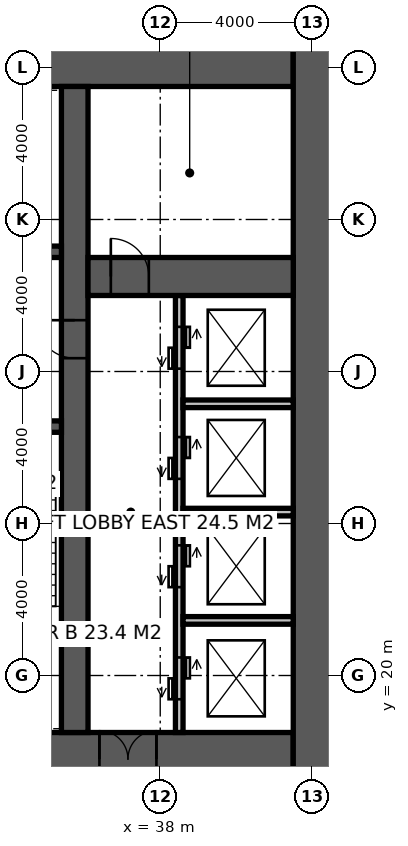
"""IFC4 building model, lengths in metres.
Left out: names, types, materials, properties, quantities, classifications, styles, units other than length and angle.
Written with IfcOpenShell. Run it as: python <this file> out.ifc"""

import sys

from ifc_helpers import new_model, si_unit, direction, frame, frame_2d, origin, place, context, subcontext, project, spatial, rectangle, extrude, element, fill, save


model = new_model("IFC4")
c1 = context("Model", 3, precision=1e-05, world=origin(), true_north=direction((0.0, 1.0)))
c2 = subcontext(c1, "Body", "Model", "MODEL_VIEW")
j1 = project(units=[si_unit("LENGTHUNIT", "METRE"), si_unit("PLANEANGLEUNIT", "RADIAN")], contexts=[c1])
p1 = place(None, origin())
s1 = spatial("IfcSite", under=j1, at=p1, CompositionType="ELEMENT")
p2 = place(p1, origin())
s2 = spatial("IfcBuilding", under=s1, at=p2, CompositionType="ELEMENT")
p3 = place(p2, frame((0.0, 0.0, 11.0)))
s3 = spatial("IfcBuildingStorey", under=s2, at=p3, CompositionType="ELEMENT", Elevation=11.0)
p4 = place(p3, frame((18.5, 17.8, -0.15), z_axis=(0.0, 0.0, 1.0), x_axis=(1.0, 0.0, 0.0)))
e1 = element("IfcWall", 1, at=p4, inside=s3, PredefinedType="SHEAR", context=c2, shape_type="SweptSolid", body=[
    extrude(rectangle(XDim=23.0, YDim=1.4, at=frame_2d((11.5, 0.0))), origin(), (0.0, 0.0, 1.0), 4.0),
])
p5 = place(p4, frame((3.45, 0.0, 0.15)))
e2 = element("IfcOpeningElement", 2, at=p5, cuts=e1, PredefinedType="OPENING", context=c2, shape_type="SweptSolid", body=[
    extrude(rectangle(XDim=1.5, YDim=2.4, at=frame_2d((0.75, 1.2))), frame((0.0, 0.71, 0.0), z_axis=(0.0, -1.0, 0.0), x_axis=(1.0, 0.0, 0.0)), (0.0, 0.0, 1.0), 1.42),
])
p6 = place(p4, frame((17.9, 0.0, 0.15)))
e3 = element("IfcOpeningElement", 3, at=p6, cuts=e1, PredefinedType="OPENING", context=c2, shape_type="SweptSolid", body=[
    extrude(rectangle(XDim=1.5, YDim=2.4, at=frame_2d((0.75, 1.2))), frame((0.0, 0.71, 0.0), z_axis=(0.0, -1.0, 0.0), x_axis=(1.0, 0.0, 0.0)), (0.0, 0.0, 1.0), 1.42),
])
p7 = place(p4, frame((0.9, 0.0, 0.15)))
e4 = element("IfcOpeningElement", 4, at=p7, cuts=e1, PredefinedType="OPENING", context=c2, shape_type="SweptSolid", body=[
    extrude(rectangle(XDim=1.0, YDim=2.2, at=frame_2d((0.5, 1.1))), frame((0.0, 0.71, 0.0), z_axis=(0.0, -1.0, 0.0), x_axis=(1.0, 0.0, 0.0)), (0.0, 0.0, 1.0), 1.42),
])
p8 = place(p3, frame((18.5, 36.2, -0.15), z_axis=(0.0, 0.0, 1.0), x_axis=(1.0, 0.0, 0.0)))
e5 = element("IfcWall", 5, at=p8, inside=s3, PredefinedType="SHEAR", context=c2, shape_type="SweptSolid", body=[
    extrude(rectangle(XDim=23.0, YDim=1.4, at=frame_2d((11.5, 0.0))), origin(), (0.0, 0.0, 1.0), 4.0),
])
p9 = place(p3, frame((42.0, 17.1, -0.15), z_axis=(0.0, 0.0, 1.0), x_axis=(0.0, 1.0, 0.0)))
e6 = element("IfcWall", 6, at=p9, inside=s3, PredefinedType="SHEAR", context=c2, shape_type="SweptSolid", body=[
    extrude(rectangle(XDim=19.8, YDim=1.0, at=frame_2d((9.9, 0.0))), origin(), (0.0, 0.0, 1.0), 4.0),
])
p10 = place(p3, frame((35.75, 18.5, -0.15), z_axis=(0.0, 0.0, 1.0), x_axis=(0.0, 1.0, 0.0)))
e7 = element("IfcWall", 7, at=p10, inside=s3, PredefinedType="SHEAR", context=c2, shape_type="SweptSolid", body=[
    extrude(rectangle(XDim=17.0, YDim=0.7, at=frame_2d((8.5, 0.0))), origin(), (0.0, 0.0, 1.0), 4.0),
])
p11 = place(p10, frame((9.85, 0.0, 0.15)))
e8 = element("IfcOpeningElement", 8, at=p11, cuts=e7, PredefinedType="OPENING", context=c2, shape_type="SweptSolid", body=[
    extrude(rectangle(XDim=1.0, YDim=2.2, at=frame_2d((0.5, 1.1))), frame((0.0, 0.36, 0.0), z_axis=(0.0, -1.0, 0.0), x_axis=(1.0, 0.0, 0.0)), (0.0, 0.0, 1.0), 0.72),
])
p12 = place(p3, frame((24.15, 26.55, -0.15), z_axis=(0.0, 0.0, 1.0), x_axis=(1.0, 0.0, 0.0)))
e9 = element("IfcWall", 9, at=p12, inside=s3, PredefinedType="SHEAR", context=c2, shape_type="SweptSolid", body=[
    extrude(rectangle(XDim=11.25, YDim=0.3, at=frame_2d((5.625, 0.0))), origin(), (0.0, 0.0, 1.0), 4.0),
])
p13 = place(p12, frame((9.25, 0.0, 0.15)))
e10 = element("IfcOpeningElement", 10, at=p13, cuts=e9, PredefinedType="OPENING", context=c2, shape_type="SweptSolid", body=[
    extrude(rectangle(XDim=1.0, YDim=2.2, at=frame_2d((0.5, 1.1))), frame((0.0, 0.16, 0.0), z_axis=(0.0, -1.0, 0.0), x_axis=(1.0, 0.0, 0.0)), (0.0, 0.0, 1.0), 0.32),
])
p14 = place(p12, frame((4.9, 0.0, 0.15)))
e11 = element("IfcOpeningElement", 11, at=p14, cuts=e9, PredefinedType="OPENING", context=c2, shape_type="SweptSolid", body=[
    extrude(rectangle(XDim=1.5, YDim=2.4, at=frame_2d((0.75, 1.2))), frame((0.0, 0.16, 0.0), z_axis=(0.0, -1.0, 0.0), x_axis=(1.0, 0.0, 0.0)), (0.0, 0.0, 1.0), 0.32),
])
p15 = place(p3, frame((24.15, 31.15, -0.15), z_axis=(0.0, 0.0, 1.0), x_axis=(1.0, 0.0, 0.0)))
e12 = element("IfcWall", 12, at=p15, inside=s3, PredefinedType="SHEAR", context=c2, shape_type="SweptSolid", body=[
    extrude(rectangle(XDim=11.25, YDim=0.3, at=frame_2d((5.625, 0.0))), origin(), (0.0, 0.0, 1.0), 4.0),
])
p16 = place(p15, frame((7.25, 0.0, 0.15)))
e13 = element("IfcOpeningElement", 13, at=p16, cuts=e12, PredefinedType="OPENING", context=c2, shape_type="SweptSolid", body=[
    extrude(rectangle(XDim=1.4, YDim=2.4, at=frame_2d((0.7, 1.2))), frame((0.0, 0.16, 0.0), z_axis=(0.0, -1.0, 0.0), x_axis=(1.0, 0.0, 0.0)), (0.0, 0.0, 1.0), 0.32),
])
p17 = place(p3, frame((38.5, 18.5, -0.15), z_axis=(0.0, 0.0, 1.0), x_axis=(0.0, 1.0, 0.0)))
e14 = element("IfcWall", 14, at=p17, inside=s3, PredefinedType="SOLIDWALL", context=c2, shape_type="SweptSolid", body=[
    extrude(rectangle(XDim=11.5, YDim=0.2, at=frame_2d((5.75, 0.0))), origin(), (0.0, 0.0, 1.0), 4.0),
])
p18 = place(p17, frame((0.875, 0.0, 0.15)))
e15 = element("IfcOpeningElement", 15, at=p18, cuts=e14, PredefinedType="OPENING", context=c2, shape_type="SweptSolid", body=[
    extrude(rectangle(XDim=1.1, YDim=2.2, at=frame_2d((0.55, 1.1))), frame((0.0, 0.11, 0.0), z_axis=(0.0, -1.0, 0.0), x_axis=(1.0, 0.0, 0.0)), (0.0, 0.0, 1.0), 0.22),
])
p19 = place(p17, frame((3.825, 0.0, 0.15)))
e16 = element("IfcOpeningElement", 16, at=p19, cuts=e14, PredefinedType="OPENING", context=c2, shape_type="SweptSolid", body=[
    extrude(rectangle(XDim=1.1, YDim=2.2, at=frame_2d((0.55, 1.1))), frame((0.0, 0.11, 0.0), z_axis=(0.0, -1.0, 0.0), x_axis=(1.0, 0.0, 0.0)), (0.0, 0.0, 1.0), 0.22),
])
p20 = place(p17, frame((6.675, 0.0, 0.15)))
e17 = element("IfcOpeningElement", 17, at=p20, cuts=e14, PredefinedType="OPENING", context=c2, shape_type="SweptSolid", body=[
    extrude(rectangle(XDim=1.1, YDim=2.2, at=frame_2d((0.55, 1.1))), frame((0.0, 0.11, 0.0), z_axis=(0.0, -1.0, 0.0), x_axis=(1.0, 0.0, 0.0)), (0.0, 0.0, 1.0), 0.22),
])
p21 = place(p17, frame((9.575, 0.0, 0.15)))
e18 = element("IfcOpeningElement", 18, at=p21, cuts=e14, PredefinedType="OPENING", context=c2, shape_type="SweptSolid", body=[
    extrude(rectangle(XDim=1.1, YDim=2.2, at=frame_2d((0.55, 1.1))), frame((0.0, 0.11, 0.0), z_axis=(0.0, -1.0, 0.0), x_axis=(1.0, 0.0, 0.0)), (0.0, 0.0, 1.0), 0.22),
])
p22 = place(p3, frame((36.1, 30.5, -0.15), z_axis=(0.0, 0.0, 1.0), x_axis=(1.0, 0.0, 0.0)))
e19 = element("IfcWall", 19, at=p22, inside=s3, PredefinedType="SHEAR", context=c2, shape_type="SweptSolid", body=[
    extrude(rectangle(XDim=5.4, YDim=1.0, at=frame_2d((2.7, 0.0))), origin(), (0.0, 0.0, 1.0), 4.0),
])
p23 = place(p22, frame((0.6, 0.0, 0.15)))
e20 = element("IfcOpeningElement", 20, at=p23, cuts=e19, PredefinedType="OPENING", context=c2, shape_type="SweptSolid", body=[
    extrude(rectangle(XDim=1.0, YDim=2.2, at=frame_2d((0.5, 1.1))), frame((0.0, 0.51, 0.0), z_axis=(0.0, -1.0, 0.0), x_axis=(1.0, 0.0, 0.0)), (0.0, 0.0, 1.0), 1.02),
])
for number, where, z_axis, x_axis in (
    (21, (38.6, 21.45, -0.15), (0.0, 0.0, 1.0), (1.0, 0.0, 0.0)),
    (22, (38.6, 24.3, -0.15), (0.0, 0.0, 1.0), (1.0, 0.0, 0.0)),
    (23, (38.6, 27.15, -0.15), (0.0, 0.0, 1.0), (1.0, 0.0, 0.0)),
):
    element("IfcWall", number, at=place(p3, frame(where, z_axis=z_axis, x_axis=x_axis)), inside=s3, PredefinedType="SOLIDWALL", context=c2, shape_type="SweptSolid", body=[
        extrude(rectangle(XDim=2.9, YDim=0.2, at=frame_2d((1.45, 0.0))), origin(), (0.0, 0.0, 1.0), 4.0),
    ])
p24 = place(p11, origin())
e24 = element("IfcDoor", 24, at=p24, inside=s3, OperationType="SINGLE_SWING_RIGHT", PredefinedType="DOOR", context=c2, shape_type="SweptSolid", body=[
    extrude(rectangle(XDim=1.0, YDim=2.2, at=frame_2d((0.5, 1.1))), frame((0.0, 0.025, 0.0), z_axis=(0.0, -1.0, 0.0), x_axis=(1.0, 0.0, 0.0)), (0.0, 0.0, 1.0), 0.05),
])
fill(e8, e24)
p25 = place(p6, origin())
e25 = element("IfcDoor", 25, at=p25, inside=s3, OperationType="DOUBLE_DOOR_DOUBLE_SWING", PredefinedType="DOOR", context=c2, shape_type="SweptSolid", body=[
    extrude(rectangle(XDim=1.5, YDim=2.4, at=frame_2d((0.75, 1.2))), frame((0.0, 0.025, 0.0), z_axis=(0.0, -1.0, 0.0), x_axis=(1.0, 0.0, 0.0)), (0.0, 0.0, 1.0), 0.05),
])
fill(e3, e25)
p26 = place(p23, origin())
e26 = element("IfcDoor", 26, at=p26, inside=s3, OperationType="SINGLE_SWING_LEFT", PredefinedType="DOOR", context=c2, shape_type="SweptSolid", body=[
    extrude(rectangle(XDim=1.0, YDim=2.2, at=frame_2d((0.5, 1.1))), frame((0.0, 0.025, 0.0), z_axis=(0.0, -1.0, 0.0), x_axis=(1.0, 0.0, 0.0)), (0.0, 0.0, 1.0), 0.05),
])
fill(e20, e26)
p27 = place(p18, origin())
e27 = element("IfcDoor", 27, at=p27, inside=s3, OperationType="DOUBLE_DOOR_SLIDING", PredefinedType="DOOR", context=c2, shape_type="SweptSolid", body=[
    extrude(rectangle(XDim=1.1, YDim=2.2, at=frame_2d((0.55, 1.1))), frame((0.0, 0.025, 0.0), z_axis=(0.0, -1.0, 0.0), x_axis=(1.0, 0.0, 0.0)), (0.0, 0.0, 1.0), 0.05),
])
fill(e15, e27)
p28 = place(p19, origin())
e28 = element("IfcDoor", 28, at=p28, inside=s3, OperationType="DOUBLE_DOOR_SLIDING", PredefinedType="DOOR", context=c2, shape_type="SweptSolid", body=[
    extrude(rectangle(XDim=1.1, YDim=2.2, at=frame_2d((0.55, 1.1))), frame((0.0, 0.025, 0.0), z_axis=(0.0, -1.0, 0.0), x_axis=(1.0, 0.0, 0.0)), (0.0, 0.0, 1.0), 0.05),
])
fill(e16, e28)
p29 = place(p20, origin())
e29 = element("IfcDoor", 29, at=p29, inside=s3, OperationType="DOUBLE_DOOR_SLIDING", PredefinedType="DOOR", context=c2, shape_type="SweptSolid", body=[
    extrude(rectangle(XDim=1.1, YDim=2.2, at=frame_2d((0.55, 1.1))), frame((0.0, 0.025, 0.0), z_axis=(0.0, -1.0, 0.0), x_axis=(1.0, 0.0, 0.0)), (0.0, 0.0, 1.0), 0.05),
])
fill(e17, e29)
p30 = place(p21, origin())
e30 = element("IfcDoor", 30, at=p30, inside=s3, OperationType="DOUBLE_DOOR_SLIDING", PredefinedType="DOOR", context=c2, shape_type="SweptSolid", body=[
    extrude(rectangle(XDim=1.1, YDim=2.2, at=frame_2d((0.55, 1.1))), frame((0.0, 0.025, 0.0), z_axis=(0.0, -1.0, 0.0), x_axis=(1.0, 0.0, 0.0)), (0.0, 0.0, 1.0), 0.05),
])
fill(e18, e30)
save(model, sys.argv[1])
